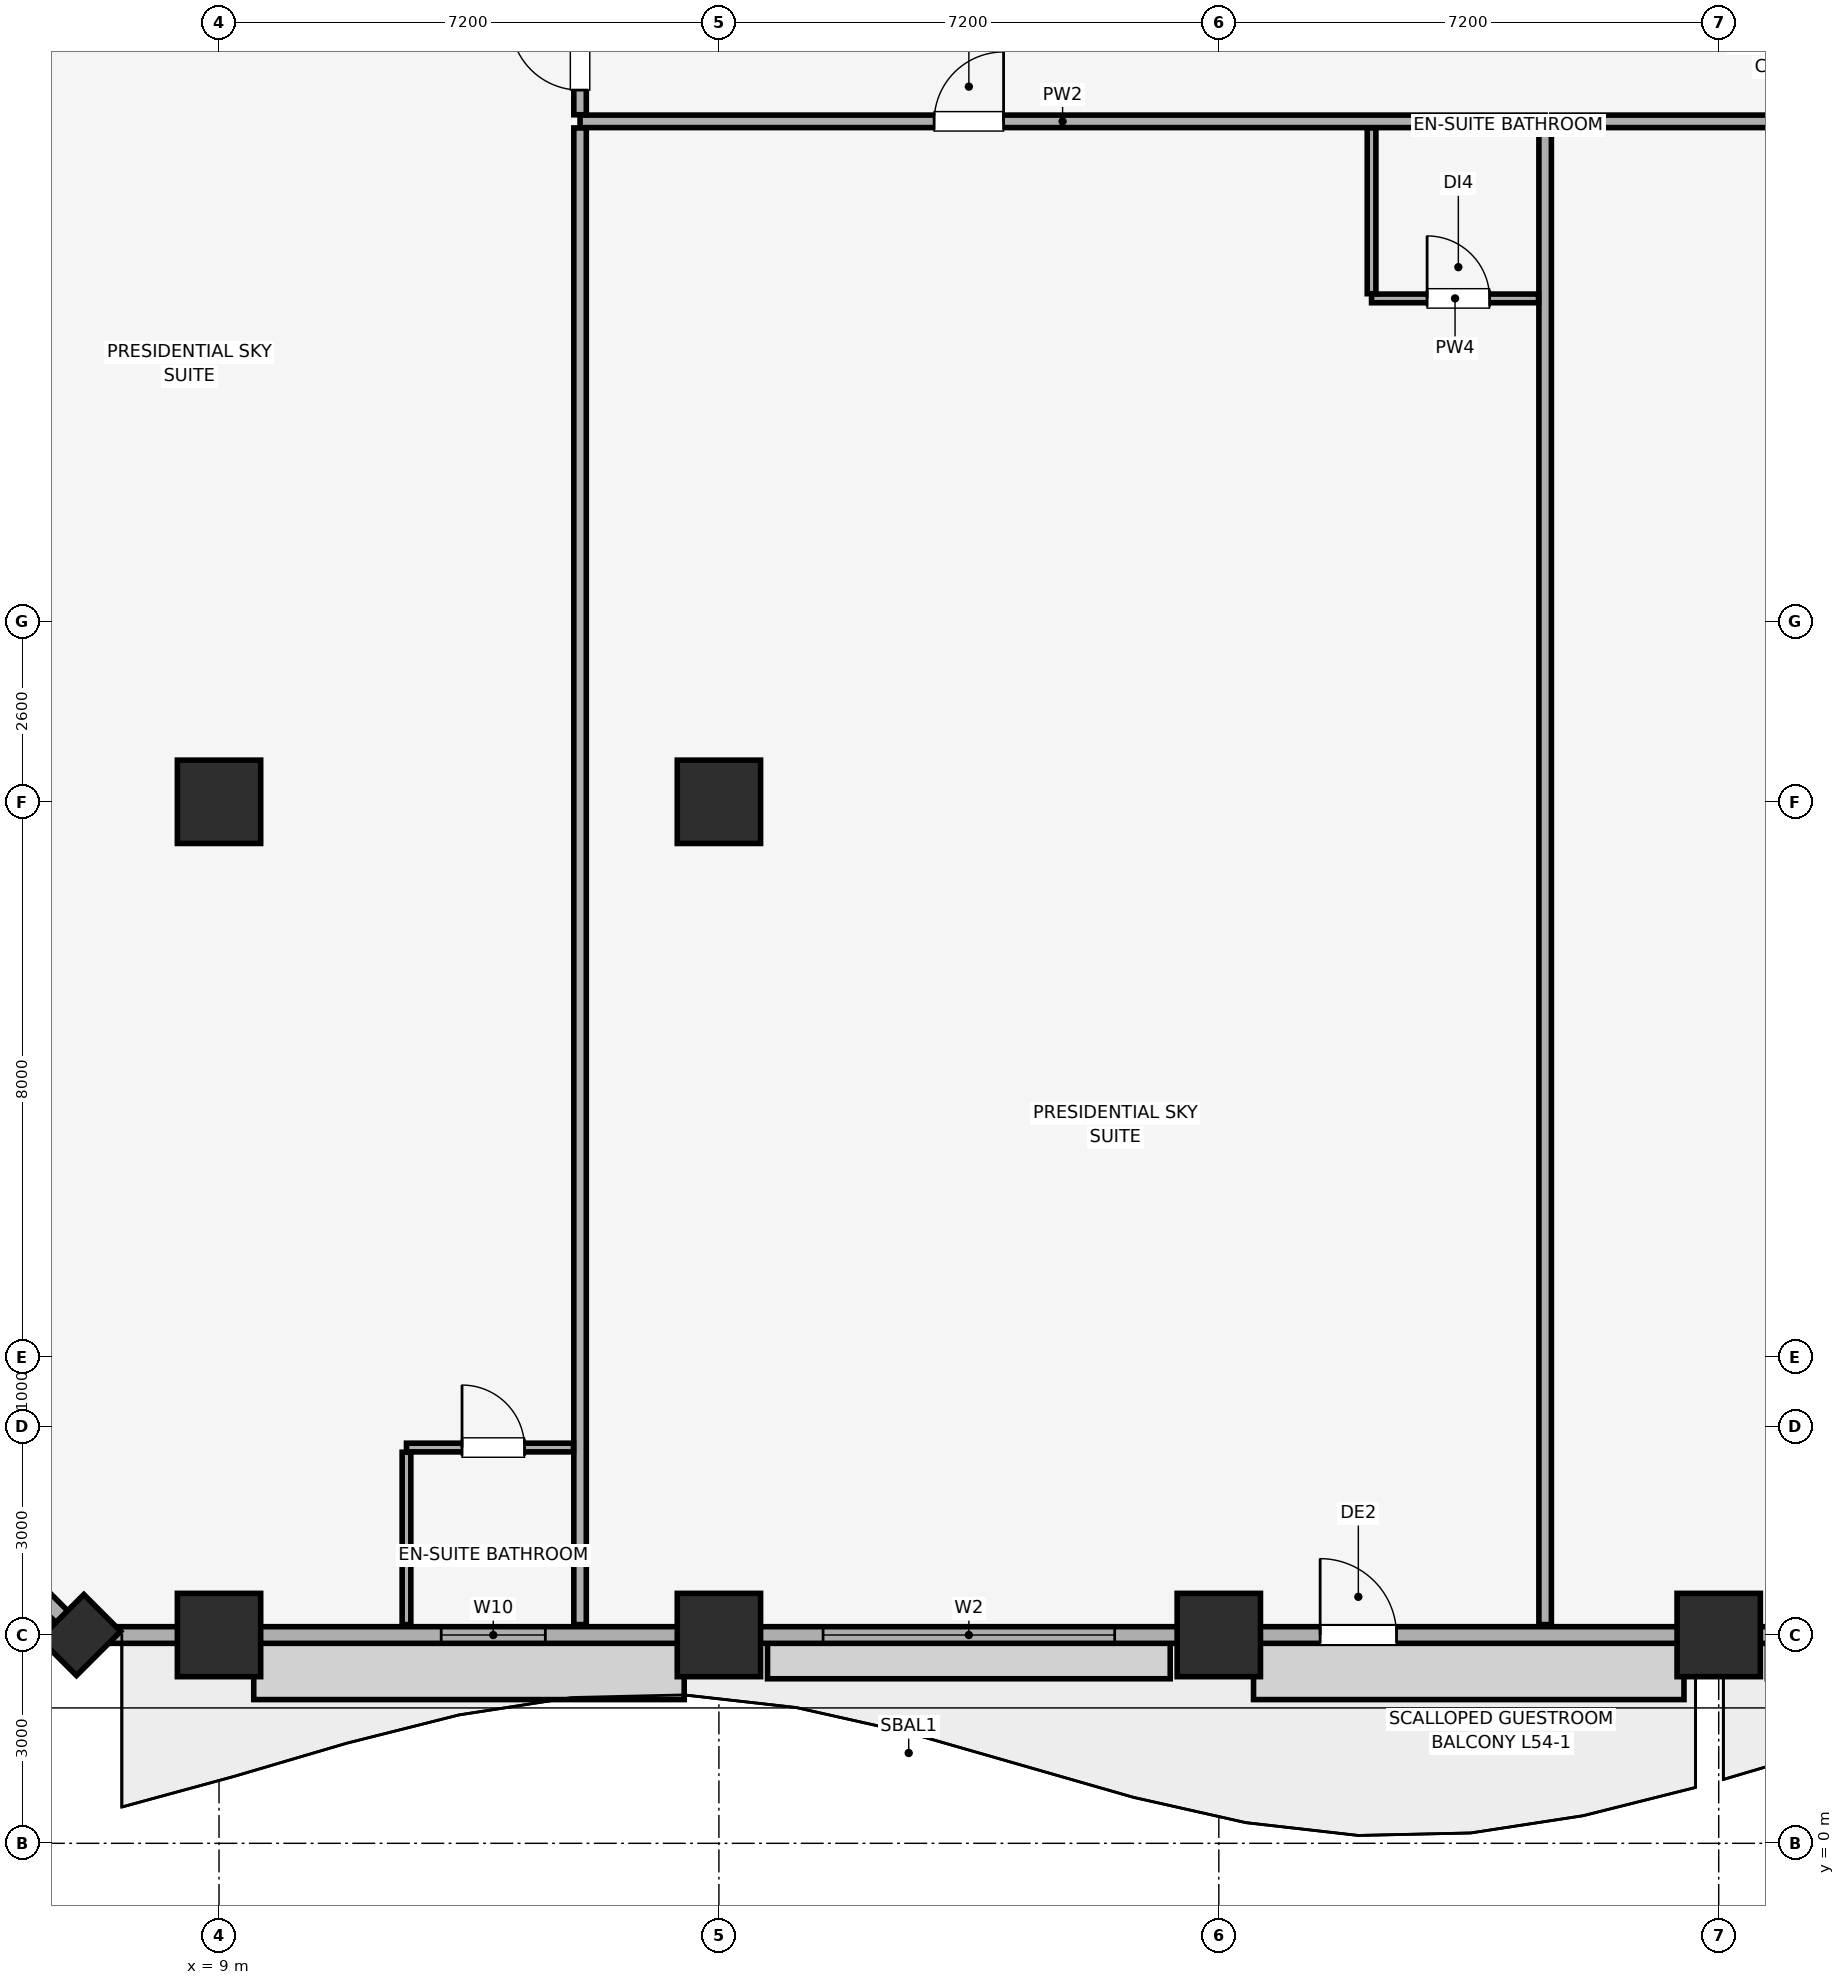
"""IFC4 building model, lengths in metres.
Left out: names, types, materials, properties, quantities, classifications, styles, units other than length and angle.
Written with IfcOpenShell. Run it as: python <this file> out.ifc"""

import sys

from ifc_helpers import new_model, si_unit, direction, frame, frame_2d, origin, origin_2d, place, context, subcontext, project, spatial, rectangle, extrude, element, fill, save


model = new_model("IFC4")
c1 = context("Model", 3, precision=1e-05, world=origin(), true_north=direction((0.0, 1.0)))
c2 = subcontext(c1, "Body", "Model", "MODEL_VIEW")
j1 = project(units=[si_unit("LENGTHUNIT", "METRE"), si_unit("PLANEANGLEUNIT", "RADIAN")], contexts=[c1])
p1 = place(None, origin())
s1 = spatial("IfcSite", under=j1, at=p1, CompositionType="ELEMENT")
p2 = place(p1, origin())
s2 = spatial("IfcBuilding", under=s1, at=p2, CompositionType="ELEMENT")
p3 = place(p2, frame((0.0, 0.0, 220.55)))
s3 = spatial("IfcBuildingStorey", under=s2, at=p3, CompositionType="ELEMENT", Elevation=220.55)
for number, where, z_axis, x_axis in (
    (1, (9.0, 3.0, 0.0), (0.0, 0.0, 1.0), (1.0, 0.0, 0.0)),
    (2, (16.2, 3.0, 0.0), (0.0, 0.0, 1.0), (1.0, 0.0, 0.0)),
    (3, (23.4, 3.0, 0.0), (0.0, 0.0, 1.0), (1.0, 0.0, 0.0)),
    (4, (30.6, 3.0, 0.0), (0.0, 0.0, 1.0), (1.0, 0.0, 0.0)),
):
    element("IfcColumn", number, at=place(p3, frame(where, z_axis=z_axis, x_axis=x_axis)), inside=s3, PredefinedType="COLUMN", context=c2, shape_type="SweptSolid", body=[
        extrude(rectangle(XDim=1.2, YDim=1.2, at=origin_2d()), origin(), (0.0, 0.0, 1.0), 3.56),
    ])
p4 = place(p3, frame((7.0, 3.0, 0.0), z_axis=(0.0, 0.0, 1.0), x_axis=(0.707106781187, 0.707106781187, 0.0)))
e5 = element("IfcColumn", 5, at=p4, inside=s3, PredefinedType="PILASTER", context=c2, shape_type="SweptSolid", body=[
    extrude(rectangle(XDim=0.9, YDim=0.75, at=origin_2d()), origin(), (0.0, 0.0, 1.0), 3.56),
])
for number, where, z_axis, x_axis in (
    (6, (9.0, 15.0, 0.0), (0.0, 0.0, 1.0), (1.0, 0.0, 0.0)),
    (7, (16.2, 15.0, 0.0), (0.0, 0.0, 1.0), (1.0, 0.0, 0.0)),
):
    element("IfcColumn", number, at=place(p3, frame(where, z_axis=z_axis, x_axis=x_axis)), inside=s3, PredefinedType="COLUMN", context=c2, shape_type="SweptSolid", body=[
        extrude(rectangle(XDim=1.2, YDim=1.2, at=origin_2d()), origin(), (0.0, 0.0, 1.0), 3.56),
    ])
p5 = place(p3, frame((7.0, 3.0, 0.0), z_axis=(0.0, 0.0, 1.0), x_axis=(1.0, 0.0, 0.0)))
e8 = element("IfcWall", 8, at=p5, inside=s3, PredefinedType="SOLIDWALL", context=c2, shape_type="SweptSolid", body=[
    extrude(rectangle(XDim=70.0, YDim=0.24, at=frame_2d((35.0, 0.0))), origin(), (0.0, 0.0, 1.0), 2.76),
])
p6 = place(p5, frame((17.86, 0.0, 0.0)))
e9 = element("IfcOpeningElement", 9, at=p6, cuts=e8, PredefinedType="OPENING", context=c2, shape_type="SweptSolid", body=[
    extrude(rectangle(XDim=1.1, YDim=2.15, at=frame_2d((0.55, 1.075))), frame((0.0, 0.13, 0.0), z_axis=(0.0, -1.0, 0.0), x_axis=(1.0, 0.0, 0.0)), (0.0, 0.0, 1.0), 0.26),
])
p7 = place(p5, frame((26.317, 0.0, 0.0)))
e10 = element("IfcOpeningElement", 10, at=p7, cuts=e8, PredefinedType="OPENING", context=c2, shape_type="SweptSolid", body=[
    extrude(rectangle(XDim=1.1, YDim=2.15, at=frame_2d((0.55, 1.075))), frame((0.0, 0.13, 0.0), z_axis=(0.0, -1.0, 0.0), x_axis=(1.0, 0.0, 0.0)), (0.0, 0.0, 1.0), 0.26),
])
p8 = place(p5, frame((57.517, 0.0, 0.0)))
e11 = element("IfcOpeningElement", 11, at=p8, cuts=e8, PredefinedType="OPENING", context=c2, shape_type="SweptSolid", body=[
    extrude(rectangle(XDim=1.1, YDim=2.15, at=frame_2d((0.55, 1.075))), frame((0.0, 0.13, 0.0), z_axis=(0.0, -1.0, 0.0), x_axis=(1.0, 0.0, 0.0)), (0.0, 0.0, 1.0), 0.26),
])
p9 = place(p5, frame((5.2, 0.0, 0.85)))
e12 = element("IfcOpeningElement", 12, at=p9, cuts=e8, PredefinedType="OPENING", context=c2, shape_type="SweptSolid", body=[
    extrude(rectangle(XDim=1.5, YDim=1.4, at=frame_2d((0.75, 0.7))), frame((0.0, 0.13, 0.0), z_axis=(0.0, -1.0, 0.0), x_axis=(1.0, 0.0, 0.0)), (0.0, 0.0, 1.0), 0.26),
])
p10 = place(p5, frame((10.7, 0.0, 0.85)))
e13 = element("IfcOpeningElement", 13, at=p10, cuts=e8, PredefinedType="OPENING", context=c2, shape_type="SweptSolid", body=[
    extrude(rectangle(XDim=4.2, YDim=1.65, at=frame_2d((2.1, 0.825))), frame((0.0, 0.13, 0.0), z_axis=(0.0, -1.0, 0.0), x_axis=(1.0, 0.0, 0.0)), (0.0, 0.0, 1.0), 0.26),
])
p11 = place(p5, frame((28.243, 0.0, 0.85)))
e14 = element("IfcOpeningElement", 14, at=p11, cuts=e8, PredefinedType="OPENING", context=c2, shape_type="SweptSolid", body=[
    extrude(rectangle(XDim=1.5, YDim=1.4, at=frame_2d((0.75, 0.7))), frame((0.0, 0.13, 0.0), z_axis=(0.0, -1.0, 0.0), x_axis=(1.0, 0.0, 0.0)), (0.0, 0.0, 1.0), 0.26),
])
p12 = place(p5, frame((31.9, 0.0, 0.85)))
e15 = element("IfcOpeningElement", 15, at=p12, cuts=e8, PredefinedType="OPENING", context=c2, shape_type="SweptSolid", body=[
    extrude(rectangle(XDim=2.4, YDim=1.5, at=frame_2d((1.2, 0.75))), frame((0.0, 0.13, 0.0), z_axis=(0.0, -1.0, 0.0), x_axis=(1.0, 0.0, 0.0)), (0.0, 0.0, 1.0), 0.26),
])
p13 = place(p5, frame((35.7, 0.0, 0.85)))
e16 = element("IfcOpeningElement", 16, at=p13, cuts=e8, PredefinedType="OPENING", context=c2, shape_type="SweptSolid", body=[
    extrude(rectangle(XDim=2.4, YDim=1.5, at=frame_2d((1.2, 0.75))), frame((0.0, 0.13, 0.0), z_axis=(0.0, -1.0, 0.0), x_axis=(1.0, 0.0, 0.0)), (0.0, 0.0, 1.0), 0.26),
])
p14 = place(p5, frame((40.7, 0.0, 0.85)))
e17 = element("IfcOpeningElement", 17, at=p14, cuts=e8, PredefinedType="OPENING", context=c2, shape_type="SweptSolid", body=[
    extrude(rectangle(XDim=4.2, YDim=1.65, at=frame_2d((2.1, 0.825))), frame((0.0, 0.13, 0.0), z_axis=(0.0, -1.0, 0.0), x_axis=(1.0, 0.0, 0.0)), (0.0, 0.0, 1.0), 0.26),
])
p15 = place(p5, frame((49.85, 0.0, 0.85)))
e18 = element("IfcOpeningElement", 18, at=p15, cuts=e8, PredefinedType="OPENING", context=c2, shape_type="SweptSolid", body=[
    extrude(rectangle(XDim=2.4, YDim=1.5, at=frame_2d((1.2, 0.75))), frame((0.0, 0.13, 0.0), z_axis=(0.0, -1.0, 0.0), x_axis=(1.0, 0.0, 0.0)), (0.0, 0.0, 1.0), 0.26),
])
p16 = place(p5, frame((54.473, 0.0, 0.85)))
e19 = element("IfcOpeningElement", 19, at=p16, cuts=e8, PredefinedType="OPENING", context=c2, shape_type="SweptSolid", body=[
    extrude(rectangle(XDim=2.4, YDim=1.5, at=frame_2d((1.2, 0.75))), frame((0.0, 0.13, 0.0), z_axis=(0.0, -1.0, 0.0), x_axis=(1.0, 0.0, 0.0)), (0.0, 0.0, 1.0), 0.26),
])
p17 = place(p5, frame((63.3, 0.0, 0.85)))
e20 = element("IfcOpeningElement", 20, at=p17, cuts=e8, PredefinedType="OPENING", context=c2, shape_type="SweptSolid", body=[
    extrude(rectangle(XDim=1.5, YDim=1.4, at=frame_2d((0.75, 0.7))), frame((0.0, 0.13, 0.0), z_axis=(0.0, -1.0, 0.0), x_axis=(1.0, 0.0, 0.0)), (0.0, 0.0, 1.0), 0.26),
])
p18 = place(p3, frame((3.0, 7.0, 0.0), z_axis=(0.0, 0.0, 1.0), x_axis=(0.707106781187, -0.707106781187, 0.0)))
e21 = element("IfcWall", 21, at=p18, inside=s3, PredefinedType="SOLIDWALL", context=c2, shape_type="SweptSolid", body=[
    extrude(rectangle(XDim=5.657, YDim=0.24, at=frame_2d((2.828, 0.0))), origin(), (0.0, 0.0, 1.0), 2.76),
])
p19 = place(p18, frame((1.778, 0.0, 0.85)))
e22 = element("IfcOpeningElement", 22, at=p19, cuts=e21, PredefinedType="OPENING", context=c2, shape_type="SweptSolid", body=[
    extrude(rectangle(XDim=2.1, YDim=1.6, at=frame_2d((1.05, 0.8))), frame((0.0, 0.13, 0.0), z_axis=(0.0, -1.0, 0.0), x_axis=(1.0, 0.0, 0.0)), (0.0, 0.0, 1.0), 0.26),
])
p20 = place(p3, frame((14.2, 24.8, 0.0), z_axis=(0.0, 0.0, 1.0), x_axis=(1.0, 0.0, 0.0)))
e23 = element("IfcWall", 23, at=p20, inside=s3, PredefinedType="PARTITIONING", context=c2, shape_type="SweptSolid", body=[
    extrude(rectangle(XDim=13.9, YDim=0.18, at=frame_2d((6.95, 0.0))), origin(), (0.0, 0.0, 1.0), 3.56),
])
p21 = place(p20, frame((5.1, 0.0, 0.0)))
e24 = element("IfcOpeningElement", 24, at=p21, cuts=e23, PredefinedType="OPENING", context=c2, shape_type="SweptSolid", body=[
    extrude(rectangle(XDim=1.0, YDim=2.15, at=frame_2d((0.5, 1.075))), frame((0.0, 0.1, 0.0), z_axis=(0.0, -1.0, 0.0), x_axis=(1.0, 0.0, 0.0)), (0.0, 0.0, 1.0), 0.2),
])
for number, where, z_axis, x_axis in (
    (25, (14.2, 3.15, 0.0), (0.0, 0.0, 1.0), (0.0, 1.0, 0.0)),
    (26, (28.1, 3.15, 0.0), (0.0, 0.0, 1.0), (0.0, 1.0, 0.0)),
):
    element("IfcWall", number, at=place(p3, frame(where, z_axis=z_axis, x_axis=x_axis)), inside=s3, PredefinedType="PARTITIONING", context=c2, shape_type="SweptSolid", body=[
        extrude(rectangle(XDim=21.555, YDim=0.18, at=frame_2d((10.778, 0.0))), origin(), (0.0, 0.0, 1.0), 3.56),
    ])
p22 = place(p3, frame((25.6, 22.25, 0.0), z_axis=(0.0, 0.0, 1.0), x_axis=(1.0, 0.0, 0.0)))
e27 = element("IfcWall", 27, at=p22, inside=s3, PredefinedType="PARTITIONING", context=c2, shape_type="SweptSolid", body=[
    extrude(rectangle(XDim=2.405, YDim=0.125, at=frame_2d((1.202, 0.0))), origin(), (0.0, 0.0, 1.0), 3.56),
])
p23 = place(p22, frame((0.8, 0.0, 0.0)))
e28 = element("IfcOpeningElement", 28, at=p23, cuts=e27, PredefinedType="OPENING", context=c2, shape_type="SweptSolid", body=[
    extrude(rectangle(XDim=0.9, YDim=2.1, at=frame_2d((0.45, 1.05))), frame((0.0, 0.073, 0.0), z_axis=(0.0, -1.0, 0.0), x_axis=(1.0, 0.0, 0.0)), (0.0, 0.0, 1.0), 0.145),
])
p24 = place(p3, frame((25.6, 22.317, 0.0), z_axis=(0.0, 0.0, 1.0), x_axis=(0.0, 1.0, 0.0)))
e29 = element("IfcWall", 29, at=p24, inside=s3, PredefinedType="PARTITIONING", context=c2, shape_type="SweptSolid", body=[
    extrude(rectangle(XDim=2.388, YDim=0.125, at=frame_2d((1.194, 0.0))), origin(), (0.0, 0.0, 1.0), 3.56),
])
p25 = place(p3, frame((28.195, 24.8, 0.0), z_axis=(0.0, 0.0, 1.0), x_axis=(1.0, 0.0, 0.0)))
e30 = element("IfcWall", 30, at=p25, inside=s3, PredefinedType="PARTITIONING", context=c2, shape_type="SweptSolid", body=[
    extrude(rectangle(XDim=13.805, YDim=0.18, at=frame_2d((6.902, 0.0))), origin(), (0.0, 0.0, 1.0), 3.56),
])
p26 = place(p25, frame((5.505, 0.0, 0.0)))
e31 = element("IfcOpeningElement", 31, at=p26, cuts=e30, PredefinedType="OPENING", context=c2, shape_type="SweptSolid", body=[
    extrude(rectangle(XDim=1.0, YDim=2.15, at=frame_2d((0.5, 1.075))), frame((0.0, 0.1, 0.0), z_axis=(0.0, -1.0, 0.0), x_axis=(1.0, 0.0, 0.0)), (0.0, 0.0, 1.0), 0.2),
])
p27 = place(p3, frame((14.2, 24.895, 0.0), z_axis=(0.0, 0.0, 1.0), x_axis=(0.0, 1.0, 0.0)))
e32 = element("IfcWall", 32, at=p27, inside=s3, PredefinedType="PARTITIONING", context=c2, shape_type="SweptSolid", body=[
    extrude(rectangle(XDim=4.41, YDim=0.18, at=frame_2d((2.205, 0.0))), origin(), (0.0, 0.0, 1.0), 3.56),
])
p28 = place(p27, frame((0.355, 0.0, 0.0)))
e33 = element("IfcOpeningElement", 33, at=p28, cuts=e32, PredefinedType="OPENING", context=c2, shape_type="SweptSolid", body=[
    extrude(rectangle(XDim=1.0, YDim=2.15, at=frame_2d((0.5, 1.075))), frame((0.0, 0.1, 0.0), z_axis=(0.0, -1.0, 0.0), x_axis=(1.0, 0.0, 0.0)), (0.0, 0.0, 1.0), 0.2),
])
p29 = place(p3, frame((11.7, 5.7, 0.0), z_axis=(0.0, 0.0, 1.0), x_axis=(1.0, 0.0, 0.0)))
e34 = element("IfcWall", 34, at=p29, inside=s3, PredefinedType="PARTITIONING", context=c2, shape_type="SweptSolid", body=[
    extrude(rectangle(XDim=2.405, YDim=0.125, at=frame_2d((1.203, 0.0))), origin(), (0.0, 0.0, 1.0), 3.56),
])
p30 = place(p29, frame((0.8, 0.0, 0.0)))
e35 = element("IfcOpeningElement", 35, at=p30, cuts=e34, PredefinedType="OPENING", context=c2, shape_type="SweptSolid", body=[
    extrude(rectangle(XDim=0.9, YDim=2.1, at=frame_2d((0.45, 1.05))), frame((0.0, 0.073, 0.0), z_axis=(0.0, -1.0, 0.0), x_axis=(1.0, 0.0, 0.0)), (0.0, 0.0, 1.0), 0.145),
])
p31 = place(p3, frame((11.7, 3.15, 0.0), z_axis=(0.0, 0.0, 1.0), x_axis=(0.0, 1.0, 0.0)))
e36 = element("IfcWall", 36, at=p31, inside=s3, PredefinedType="PARTITIONING", context=c2, shape_type="SweptSolid", body=[
    extrude(rectangle(XDim=2.483, YDim=0.125, at=frame_2d((1.241, 0.0))), origin(), (0.0, 0.0, 1.0), 3.56),
])
p32 = place(p6, origin())
e37 = element("IfcDoor", 37, at=p32, inside=s3, OperationType="SINGLE_SWING_LEFT", PredefinedType="DOOR", context=c2, shape_type="SweptSolid", body=[
    extrude(rectangle(XDim=1.1, YDim=2.15, at=frame_2d((0.55, 1.075))), frame((0.0, 0.025, 0.0), z_axis=(0.0, -1.0, 0.0), x_axis=(1.0, 0.0, 0.0)), (0.0, 0.0, 1.0), 0.05),
])
fill(e9, e37)
p33 = place(p9, origin())
e38 = element("IfcWindow", 38, at=p33, inside=s3, PartitioningType="SINGLE_PANEL", PredefinedType="WINDOW", context=c2, shape_type="SweptSolid", body=[
    extrude(rectangle(XDim=1.5, YDim=1.4, at=frame_2d((0.75, 0.7))), frame((0.0, 0.03, 0.0), z_axis=(0.0, -1.0, 0.0), x_axis=(1.0, 0.0, 0.0)), (0.0, 0.0, 1.0), 0.06),
])
fill(e12, e38)
p34 = place(p10, origin())
e39 = element("IfcWindow", 39, at=p34, inside=s3, PartitioningType="SINGLE_PANEL", PredefinedType="WINDOW", context=c2, shape_type="SweptSolid", body=[
    extrude(rectangle(XDim=4.2, YDim=1.65, at=frame_2d((2.1, 0.825))), frame((0.0, 0.03, 0.0), z_axis=(0.0, -1.0, 0.0), x_axis=(1.0, 0.0, 0.0)), (0.0, 0.0, 1.0), 0.06),
])
fill(e13, e39)
p35 = place(p21, origin())
e40 = element("IfcDoor", 40, at=p35, inside=s3, OperationType="SINGLE_SWING_RIGHT", PredefinedType="DOOR", context=c2, shape_type="SweptSolid", body=[
    extrude(rectangle(XDim=1.0, YDim=2.15, at=frame_2d((0.5, 1.075))), frame((0.0, 0.025, 0.0), z_axis=(0.0, -1.0, 0.0), x_axis=(1.0, 0.0, 0.0)), (0.0, 0.0, 1.0), 0.05),
])
fill(e24, e40)
p36 = place(p23, origin())
e41 = element("IfcDoor", 41, at=p36, inside=s3, OperationType="SINGLE_SWING_LEFT", PredefinedType="DOOR", context=c2, shape_type="SweptSolid", body=[
    extrude(rectangle(XDim=0.9, YDim=2.1, at=frame_2d((0.45, 1.05))), frame((0.0, 0.025, 0.0), z_axis=(0.0, -1.0, 0.0), x_axis=(1.0, 0.0, 0.0)), (0.0, 0.0, 1.0), 0.05),
])
fill(e28, e41)
p37 = place(p28, origin())
e42 = element("IfcDoor", 42, at=p37, inside=s3, OperationType="SINGLE_SWING_RIGHT", PredefinedType="DOOR", context=c2, shape_type="SweptSolid", body=[
    extrude(rectangle(XDim=1.0, YDim=2.15, at=frame_2d((0.5, 1.075))), frame((0.0, 0.025, 0.0), z_axis=(0.0, -1.0, 0.0), x_axis=(1.0, 0.0, 0.0)), (0.0, 0.0, 1.0), 0.05),
])
fill(e33, e42)
p38 = place(p30, origin())
e43 = element("IfcDoor", 43, at=p38, inside=s3, OperationType="SINGLE_SWING_LEFT", PredefinedType="DOOR", context=c2, shape_type="SweptSolid", body=[
    extrude(rectangle(XDim=0.9, YDim=2.1, at=frame_2d((0.45, 1.05))), frame((0.0, 0.025, 0.0), z_axis=(0.0, -1.0, 0.0), x_axis=(1.0, 0.0, 0.0)), (0.0, 0.0, 1.0), 0.05),
])
fill(e35, e43)
save(model, sys.argv[1])
